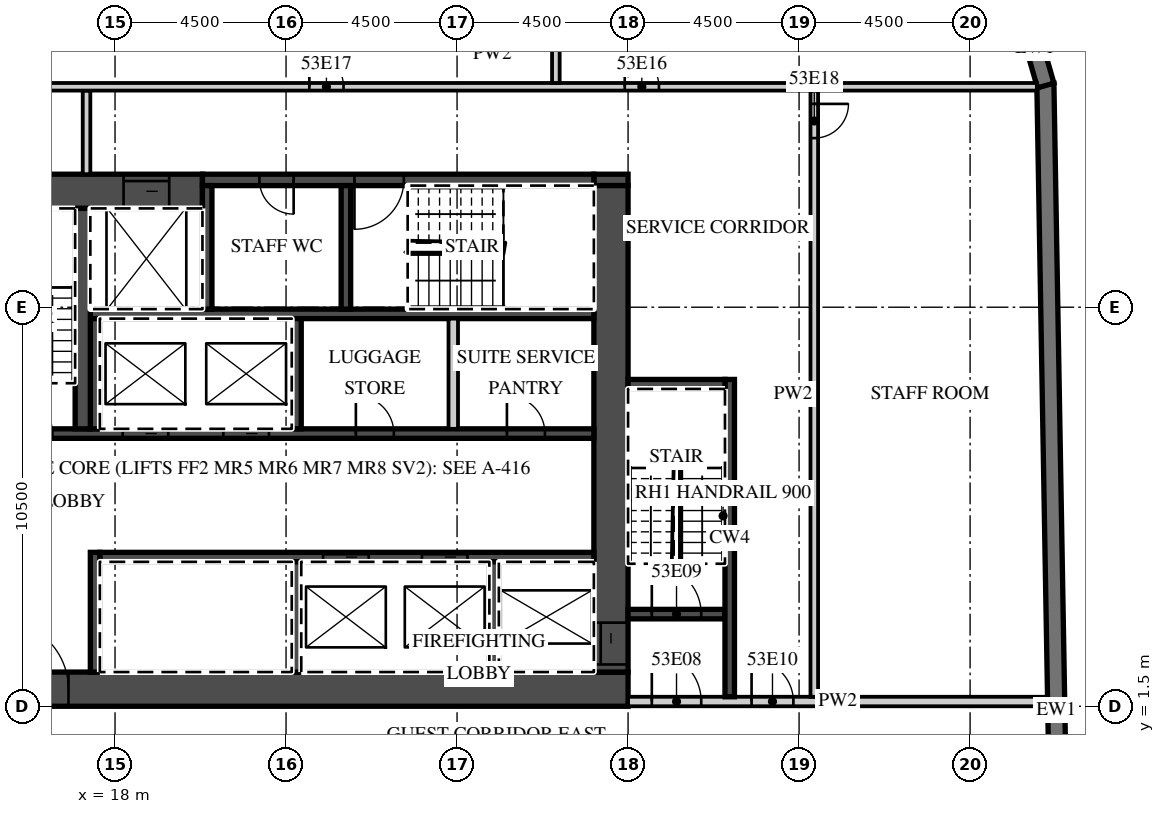
"""IFC4 building model, lengths in metres.
Left out: names, types, materials, properties, quantities, classifications, styles, units other than length and angle.
Written with IfcOpenShell. Run it as: python <this file> out.ifc"""

import sys

from ifc_helpers import new_model, si_unit, direction, frame, frame_2d, origin, place, context, subcontext, project, spatial, polyline, rectangle, outline, extrude, element, fill, save


model = new_model("IFC4")
c1 = context("Model", 3, precision=1e-05, world=origin(), true_north=direction((0.0, 1.0)))
c2 = subcontext(c1, "Body", "Model", "MODEL_VIEW")
j1 = project(units=[si_unit("LENGTHUNIT", "METRE"), si_unit("PLANEANGLEUNIT", "RADIAN")], contexts=[c1])
p1 = place(None, origin())
s1 = spatial("IfcSite", under=j1, at=p1, CompositionType="ELEMENT")
p2 = place(p1, origin())
s2 = spatial("IfcBuilding", under=s1, at=p2, CompositionType="ELEMENT")
p3 = place(p2, frame((0.0, 0.0, 221.0)))
s3 = spatial("IfcBuildingStorey", under=s2, at=p3, CompositionType="ELEMENT", Elevation=221.0)
p4 = place(p3, frame((43.057, -15.103, 0.0), z_axis=(0.0, 0.0, 1.0), x_axis=(-0.017452408953, 0.999847695112, 0.0)))
e1 = element("IfcWall", 1, at=p4, inside=s3, PredefinedType="SOLIDWALL", context=c2, shape_type="SweptSolid", body=[
    extrude(rectangle(XDim=33.0, YDim=0.45, at=frame_2d((16.5, 0.0))), origin(), (0.0, 0.0, 1.0), 3.02),
])
p5 = place(p3, frame((42.49, 17.833, 0.0), z_axis=(0.0, 0.0, 1.0), x_axis=(-0.275546368831, 0.961287781377, 0.0)))
e2 = element("IfcWall", 2, at=p5, inside=s3, PredefinedType="SOLIDWALL", context=c2, shape_type="SweptSolid", body=[
    extrude(outline(polyline([(0.0, -0.225), (2.071, -0.225), (1.95, 0.225), (0.121, 0.225), (0.0, -0.225)])), origin(), (0.0, 0.0, 1.0), 3.02),
])
p6 = place(p3, frame((13.5, 1.95, 0.0), z_axis=(0.0, 0.0, 1.0), x_axis=(1.0, 0.0, 0.0)))
e3 = element("IfcWall", 3, at=p6, inside=s3, PredefinedType="SHEAR", context=c2, shape_type="SweptSolid", body=[
    extrude(rectangle(XDim=18.0, YDim=0.9, at=frame_2d((9.0, 0.0))), origin(), (0.0, 0.0, 1.0), 3.02),
])
p7 = place(p6, frame((1.475, 0.0, 0.0)))
e4 = element("IfcOpeningElement", 4, at=p7, cuts=e3, PredefinedType="OPENING", context=c2, shape_type="SweptSolid", body=[
    extrude(rectangle(XDim=1.8, YDim=2.1, at=frame_2d((0.9, 1.05))), frame((0.0, 0.46, 0.0), z_axis=(0.0, -1.0, 0.0), x_axis=(1.0, 0.0, 0.0)), (0.0, 0.0, 1.0), 0.92),
])
p8 = place(p3, frame((13.5, 15.05, 0.0), z_axis=(0.0, 0.0, 1.0), x_axis=(1.0, 0.0, 0.0)))
e5 = element("IfcWall", 5, at=p8, inside=s3, PredefinedType="SHEAR", context=c2, shape_type="SweptSolid", body=[
    extrude(rectangle(XDim=6.8, YDim=0.9, at=frame_2d((3.4, 0.0))), origin(), (0.0, 0.0, 1.0), 3.02),
])
p9 = place(p8, frame((4.725, 0.0, 0.0)))
e6 = element("IfcOpeningElement", 6, at=p9, cuts=e5, PredefinedType="OPENING", context=c2, shape_type="SweptSolid", body=[
    extrude(rectangle(XDim=1.2, YDim=2.1, at=frame_2d((0.6, 1.05))), frame((0.0, 0.46, 0.0), z_axis=(0.0, -1.0, 0.0), x_axis=(1.0, 0.0, 0.0)), (0.0, 0.0, 1.0), 0.92),
])
p10 = place(p3, frame((30.6, 15.35, 0.0), z_axis=(0.0, 0.0, 1.0), x_axis=(1.0, 0.0, 0.0)))
e7 = element("IfcWall", 7, at=p10, inside=s3, PredefinedType="SHEAR", context=c2, shape_type="SweptSolid", body=[
    extrude(rectangle(XDim=0.9, YDim=0.3, at=frame_2d((0.45, 0.0))), origin(), (0.0, 0.0, 1.0), 3.02),
])
p11 = place(p3, frame((20.3, 15.35, 0.0), z_axis=(0.0, 0.0, 1.0), x_axis=(1.0, 0.0, 0.0)))
e8 = element("IfcWall", 8, at=p11, inside=s3, PredefinedType="SHEAR", context=c2, shape_type="SweptSolid", body=[
    extrude(rectangle(XDim=10.3, YDim=0.3, at=frame_2d((5.15, 0.0))), origin(), (0.0, 0.0, 1.0), 3.02),
])
p12 = place(p11, frame((4.0, 0.0, 0.0)))
e9 = element("IfcOpeningElement", 9, at=p12, cuts=e8, PredefinedType="OPENING", context=c2, shape_type="SweptSolid", body=[
    extrude(rectangle(XDim=1.3, YDim=2.1, at=frame_2d((0.65, 1.05))), frame((0.0, 0.16, 0.0), z_axis=(0.0, -1.0, 0.0), x_axis=(1.0, 0.0, 0.0)), (0.0, 0.0, 1.0), 0.32),
])
p13 = place(p11, frame((1.5, 0.0, 0.0)))
e10 = element("IfcOpeningElement", 10, at=p13, cuts=e8, PredefinedType="OPENING", context=c2, shape_type="SweptSolid", body=[
    extrude(rectangle(XDim=0.9, YDim=2.1, at=frame_2d((0.45, 1.05))), frame((0.0, 0.16, 0.0), z_axis=(0.0, -1.0, 0.0), x_axis=(1.0, 0.0, 0.0)), (0.0, 0.0, 1.0), 0.32),
])
p14 = place(p3, frame((31.05, 2.4, 0.0), z_axis=(0.0, 0.0, 1.0), x_axis=(0.0, 1.0, 0.0)))
e11 = element("IfcWall", 11, at=p14, inside=s3, PredefinedType="SHEAR", context=c2, shape_type="SweptSolid", body=[
    extrude(rectangle(XDim=12.8, YDim=0.9, at=frame_2d((6.4, 0.0))), origin(), (0.0, 0.0, 1.0), 3.02),
])
p15 = place(p14, frame((0.2, 0.0, 0.0)))
e12 = element("IfcOpeningElement", 12, at=p15, cuts=e11, PredefinedType="OPENING", context=c2, shape_type="SweptSolid", body=[
    extrude(rectangle(XDim=1.1, YDim=2.1, at=frame_2d((0.55, 1.05))), frame((0.0, 0.46, 0.0), z_axis=(0.0, -1.0, 0.0), x_axis=(1.0, 0.0, 0.0)), (0.0, 0.0, 1.0), 0.92),
])
p16 = place(p3, frame((17.6, 5.425, 0.0), z_axis=(0.0, 0.0, 1.0), x_axis=(1.0, 0.0, 0.0)))
e13 = element("IfcWall", 13, at=p16, inside=s3, PredefinedType="SHEAR", context=c2, shape_type="SweptSolid", body=[
    extrude(rectangle(XDim=13.0, YDim=0.25, at=frame_2d((6.5, 0.0))), origin(), (0.0, 0.0, 1.0), 3.02),
])
p17 = place(p16, frame((8.475, 0.0, 0.0)))
e14 = element("IfcOpeningElement", 14, at=p17, cuts=e13, PredefinedType="OPENING", context=c2, shape_type="SweptSolid", body=[
    extrude(rectangle(XDim=1.2, YDim=2.1, at=frame_2d((0.6, 1.05))), frame((0.0, 0.135, 0.0), z_axis=(0.0, -1.0, 0.0), x_axis=(1.0, 0.0, 0.0)), (0.0, 0.0, 1.0), 0.27),
])
p18 = place(p16, frame((5.875, 0.0, 0.0)))
e15 = element("IfcOpeningElement", 15, at=p18, cuts=e13, PredefinedType="OPENING", context=c2, shape_type="SweptSolid", body=[
    extrude(rectangle(XDim=1.2, YDim=2.1, at=frame_2d((0.6, 1.05))), frame((0.0, 0.135, 0.0), z_axis=(0.0, -1.0, 0.0), x_axis=(1.0, 0.0, 0.0)), (0.0, 0.0, 1.0), 0.27),
])
p19 = place(p3, frame((17.475, 2.4, 0.0), z_axis=(0.0, 0.0, 1.0), x_axis=(0.0, 1.0, 0.0)))
e16 = element("IfcWall", 16, at=p19, inside=s3, PredefinedType="SHEAR", context=c2, shape_type="SweptSolid", body=[
    extrude(rectangle(XDim=3.15, YDim=0.25, at=frame_2d((1.575, 0.0))), origin(), (0.0, 0.0, 1.0), 3.02),
])
for number, where, z_axis, x_axis in (
    (17, (27.975, 2.4, 0.0), (0.0, 0.0, 1.0), (0.0, 1.0, 0.0)),
    (18, (22.775, 2.4, 0.0), (0.0, 0.0, 1.0), (0.0, 1.0, 0.0)),
):
    element("IfcWall", number, at=place(p3, frame(where, z_axis=z_axis, x_axis=x_axis)), inside=s3, PredefinedType="SHEAR", context=c2, shape_type="SweptSolid", body=[
        extrude(rectangle(XDim=2.9, YDim=0.25, at=frame_2d((1.45, 0.0))), origin(), (0.0, 0.0, 1.0), 3.02),
    ])
p20 = place(p3, frame((14.4, 8.675, 0.0), z_axis=(0.0, 0.0, 1.0), x_axis=(1.0, 0.0, 0.0)))
e19 = element("IfcWall", 19, at=p20, inside=s3, PredefinedType="SHEAR", context=c2, shape_type="SweptSolid", body=[
    extrude(rectangle(XDim=16.2, YDim=0.25, at=frame_2d((8.1, 0.0))), origin(), (0.0, 0.0, 1.0), 3.02),
])
p21 = place(p20, frame((6.45, 0.0, 0.0)))
e20 = element("IfcOpeningElement", 20, at=p21, cuts=e19, PredefinedType="OPENING", context=c2, shape_type="SweptSolid", body=[
    extrude(rectangle(XDim=1.2, YDim=2.1, at=frame_2d((0.6, 1.05))), frame((0.0, 0.135, 0.0), z_axis=(0.0, -1.0, 0.0), x_axis=(1.0, 0.0, 0.0)), (0.0, 0.0, 1.0), 0.27),
])
p22 = place(p20, frame((3.8, 0.0, 0.0)))
e21 = element("IfcOpeningElement", 21, at=p22, cuts=e19, PredefinedType="OPENING", context=c2, shape_type="SweptSolid", body=[
    extrude(rectangle(XDim=1.2, YDim=2.1, at=frame_2d((0.6, 1.05))), frame((0.0, 0.135, 0.0), z_axis=(0.0, -1.0, 0.0), x_axis=(1.0, 0.0, 0.0)), (0.0, 0.0, 1.0), 0.27),
])
p23 = place(p20, frame((0.65, 0.0, 0.0)))
e22 = element("IfcOpeningElement", 22, at=p23, cuts=e19, PredefinedType="OPENING", context=c2, shape_type="SweptSolid", body=[
    extrude(rectangle(XDim=1.3, YDim=2.1, at=frame_2d((0.65, 1.05))), frame((0.0, 0.135, 0.0), z_axis=(0.0, -1.0, 0.0), x_axis=(1.0, 0.0, 0.0)), (0.0, 0.0, 1.0), 0.27),
])
p24 = place(p20, frame((13.913, 0.0, 0.0)))
e23 = element("IfcOpeningElement", 23, at=p24, cuts=e19, PredefinedType="OPENING", context=c2, shape_type="SweptSolid", body=[
    extrude(rectangle(XDim=1.0, YDim=2.1, at=frame_2d((0.5, 1.05))), frame((0.0, 0.135, 0.0), z_axis=(0.0, -1.0, 0.0), x_axis=(1.0, 0.0, 0.0)), (0.0, 0.0, 1.0), 0.27),
])
p25 = place(p20, frame((9.938, 0.0, 0.0)))
e24 = element("IfcOpeningElement", 24, at=p25, cuts=e19, PredefinedType="OPENING", context=c2, shape_type="SweptSolid", body=[
    extrude(rectangle(XDim=1.0, YDim=2.1, at=frame_2d((0.5, 1.05))), frame((0.0, 0.135, 0.0), z_axis=(0.0, -1.0, 0.0), x_axis=(1.0, 0.0, 0.0)), (0.0, 0.0, 1.0), 0.27),
])
p26 = place(p3, frame((17.35, 11.825, 0.0), z_axis=(0.0, 0.0, 1.0), x_axis=(1.0, 0.0, 0.0)))
e25 = element("IfcWall", 25, at=p26, inside=s3, PredefinedType="SHEAR", context=c2, shape_type="SweptSolid", body=[
    extrude(rectangle(XDim=13.25, YDim=0.25, at=frame_2d((6.625, 0.0))), origin(), (0.0, 0.0, 1.0), 3.02),
])
for number, where, z_axis, x_axis in (
    (26, (17.475, 8.8, 0.0), (0.0, 0.0, 1.0), (0.0, 1.0, 0.0)),
    (27, (22.775, 8.8, 0.0), (0.0, 0.0, 1.0), (0.0, 1.0, 0.0)),
):
    element("IfcWall", number, at=place(p3, frame(where, z_axis=z_axis, x_axis=x_axis)), inside=s3, PredefinedType="SHEAR", context=c2, shape_type="SweptSolid", body=[
        extrude(rectangle(XDim=2.9, YDim=0.25, at=frame_2d((1.45, 0.0))), origin(), (0.0, 0.0, 1.0), 3.02),
    ])
p27 = place(p3, frame((26.9, 8.8, 0.0), z_axis=(0.0, 0.0, 1.0), x_axis=(0.0, 1.0, 0.0)))
e28 = element("IfcWall", 28, at=p27, inside=s3, PredefinedType="PARTITIONING", context=c2, shape_type="SweptSolid", body=[
    extrude(rectangle(XDim=2.9, YDim=0.25, at=frame_2d((1.45, 0.0))), origin(), (0.0, 0.0, 1.0), 3.02),
])
p28 = place(p3, frame((17.15, 8.8, 0.0), z_axis=(0.0, 0.0, 1.0), x_axis=(0.0, 1.0, 0.0)))
e29 = element("IfcWall", 29, at=p28, inside=s3, PredefinedType="SHEAR", context=c2, shape_type="SweptSolid", body=[
    extrude(rectangle(XDim=5.8, YDim=0.4, at=frame_2d((2.9, 0.0))), origin(), (0.0, 0.0, 1.0), 3.02),
])
for number, where, z_axis, x_axis in (
    (30, (20.425, 11.95, 0.0), (0.0, 0.0, 1.0), (0.0, 1.0, 0.0)),
    (31, (24.075, 11.95, 0.0), (0.0, 0.0, 1.0), (0.0, 1.0, 0.0)),
):
    element("IfcWall", number, at=place(p3, frame(where, z_axis=z_axis, x_axis=x_axis)), inside=s3, PredefinedType="SHEAR", context=c2, shape_type="SweptSolid", body=[
        extrude(rectangle(XDim=3.25, YDim=0.25, at=frame_2d((1.625, 0.0))), origin(), (0.0, 0.0, 1.0), 3.02),
    ])
p29 = place(p3, frame((31.5, 1.625, 0.0), z_axis=(0.0, 0.0, 1.0), x_axis=(1.0, 0.0, 0.0)))
e32 = element("IfcWall", 32, at=p29, inside=s3, PredefinedType="PARTITIONING", context=c2, shape_type="SweptSolid", body=[
    extrude(rectangle(XDim=11.04, YDim=0.25, at=frame_2d((5.52, 0.0))), origin(), (0.0, 0.0, 1.0), 3.02),
])
p30 = place(p29, frame((0.625, 0.0, 0.0)))
e33 = element("IfcOpeningElement", 33, at=p30, cuts=e32, PredefinedType="OPENING", context=c2, shape_type="SweptSolid", body=[
    extrude(rectangle(XDim=1.3, YDim=2.1, at=frame_2d((0.65, 1.05))), frame((0.0, 0.135, 0.0), z_axis=(0.0, -1.0, 0.0), x_axis=(1.0, 0.0, 0.0)), (0.0, 0.0, 1.0), 0.27),
])
p31 = place(p29, frame((3.25, 0.0, 0.0)))
e34 = element("IfcOpeningElement", 34, at=p31, cuts=e32, PredefinedType="OPENING", context=c2, shape_type="SweptSolid", body=[
    extrude(rectangle(XDim=1.1, YDim=2.1, at=frame_2d((0.55, 1.05))), frame((0.0, 0.135, 0.0), z_axis=(0.0, -1.0, 0.0), x_axis=(1.0, 0.0, 0.0)), (0.0, 0.0, 1.0), 0.27),
])
p32 = place(p3, frame((31.5, 3.925, 0.0), z_axis=(0.0, 0.0, 1.0), x_axis=(1.0, 0.0, 0.0)))
e35 = element("IfcWall", 35, at=p32, inside=s3, PredefinedType="SHEAR", context=c2, shape_type="SweptSolid", body=[
    extrude(rectangle(XDim=2.55, YDim=0.25, at=frame_2d((1.275, 0.0))), origin(), (0.0, 0.0, 1.0), 3.02),
])
p33 = place(p32, frame((0.625, 0.0, 0.0)))
e36 = element("IfcOpeningElement", 36, at=p33, cuts=e35, PredefinedType="OPENING", context=c2, shape_type="SweptSolid", body=[
    extrude(rectangle(XDim=1.3, YDim=2.1, at=frame_2d((0.65, 1.05))), frame((0.0, 0.135, 0.0), z_axis=(0.0, -1.0, 0.0), x_axis=(1.0, 0.0, 0.0)), (0.0, 0.0, 1.0), 0.27),
])
p34 = place(p3, frame((34.175, 1.75, 0.0), z_axis=(0.0, 0.0, 1.0), x_axis=(0.0, 1.0, 0.0)))
e37 = element("IfcWall", 37, at=p34, inside=s3, PredefinedType="SHEAR", context=c2, shape_type="SweptSolid", body=[
    extrude(rectangle(XDim=8.35, YDim=0.25, at=frame_2d((4.175, 0.0))), origin(), (0.0, 0.0, 1.0), 3.02),
])
p35 = place(p3, frame((31.5, 9.975, 0.0), z_axis=(0.0, 0.0, 1.0), x_axis=(1.0, 0.0, 0.0)))
e38 = element("IfcWall", 38, at=p35, inside=s3, PredefinedType="SHEAR", context=c2, shape_type="SweptSolid", body=[
    extrude(rectangle(XDim=2.55, YDim=0.25, at=frame_2d((1.275, 0.0))), origin(), (0.0, 0.0, 1.0), 3.02),
])
p36 = place(p3, frame((17.25, 15.5, 0.0), z_axis=(0.0, 0.0, 1.0), x_axis=(0.0, 1.0, 0.0)))
e39 = element("IfcWall", 39, at=p36, inside=s3, PredefinedType="PARTITIONING", context=c2, shape_type="SweptSolid", body=[
    extrude(rectangle(XDim=2.2, YDim=0.2, at=frame_2d((1.1, 0.0))), origin(), (0.0, 0.0, 1.0), 3.02),
])
p37 = place(p3, frame((36.4, 1.75, 0.0), z_axis=(0.0, 0.0, 1.0), x_axis=(0.0, 1.0, 0.0)))
e40 = element("IfcWall", 40, at=p37, inside=s3, PredefinedType="PARTITIONING", context=c2, shape_type="SweptSolid", body=[
    extrude(rectangle(XDim=15.95, YDim=0.2, at=frame_2d((7.975, 0.0))), origin(), (0.0, 0.0, 1.0), 3.02),
])
p38 = place(p37, frame((14.7, 0.0, 0.0)))
e41 = element("IfcOpeningElement", 41, at=p38, cuts=e40, PredefinedType="OPENING", context=c2, shape_type="SweptSolid", body=[
    extrude(rectangle(XDim=0.9, YDim=2.1, at=frame_2d((0.45, 1.05))), frame((0.0, 0.11, 0.0), z_axis=(0.0, -1.0, 0.0), x_axis=(1.0, 0.0, 0.0)), (0.0, 0.0, 1.0), 0.22),
])
p39 = place(p3, frame((13.6, 17.8, 0.0), z_axis=(0.0, 0.0, 1.0), x_axis=(1.0, 0.0, 0.0)))
e42 = element("IfcWall", 42, at=p39, inside=s3, PredefinedType="PARTITIONING", context=c2, shape_type="SweptSolid", body=[
    extrude(rectangle(XDim=28.657, YDim=0.2, at=frame_2d((14.329, 0.0))), origin(), (0.0, 0.0, 1.0), 3.02),
])
p40 = place(p39, frame((17.812, 0.0, 0.0)))
e43 = element("IfcOpeningElement", 43, at=p40, cuts=e42, PredefinedType="OPENING", context=c2, shape_type="SweptSolid", body=[
    extrude(rectangle(XDim=0.9, YDim=2.1, at=frame_2d((0.45, 1.05))), frame((0.0, 0.11, 0.0), z_axis=(0.0, -1.0, 0.0), x_axis=(1.0, 0.0, 0.0)), (0.0, 0.0, 1.0), 0.22),
])
p41 = place(p39, frame((9.512, 0.0, 0.0)))
e44 = element("IfcOpeningElement", 44, at=p41, cuts=e42, PredefinedType="OPENING", context=c2, shape_type="SweptSolid", body=[
    extrude(rectangle(XDim=0.9, YDim=2.1, at=frame_2d((0.45, 1.05))), frame((0.0, 0.11, 0.0), z_axis=(0.0, -1.0, 0.0), x_axis=(1.0, 0.0, 0.0)), (0.0, 0.0, 1.0), 0.22),
])
p42 = place(p3, frame((29.6, 17.9, 0.0), z_axis=(0.0, 0.0, 1.0), x_axis=(0.0, 1.0, 0.0)))
e45 = element("IfcWall", 45, at=p42, inside=s3, PredefinedType="PARTITIONING", context=c2, shape_type="SweptSolid", body=[
    extrude(rectangle(XDim=3.318, YDim=0.2, at=frame_2d((1.659, 0.0))), origin(), (0.0, 0.0, 1.0), 3.02),
])
p43 = place(p21, origin())
e46 = element("IfcDoor", 46, at=p43, inside=s3, OperationType="SLIDING_TO_LEFT", PredefinedType="DOOR", context=c2, shape_type="SweptSolid", body=[
    extrude(rectangle(XDim=1.2, YDim=2.1, at=frame_2d((0.6, 1.05))), frame((0.0, 0.025, 0.0), z_axis=(0.0, -1.0, 0.0), x_axis=(1.0, 0.0, 0.0)), (0.0, 0.0, 1.0), 0.05),
])
fill(e20, e46)
p44 = place(p22, origin())
e47 = element("IfcDoor", 47, at=p44, inside=s3, OperationType="SLIDING_TO_RIGHT", PredefinedType="DOOR", context=c2, shape_type="SweptSolid", body=[
    extrude(rectangle(XDim=1.2, YDim=2.1, at=frame_2d((0.6, 1.05))), frame((0.0, 0.025, 0.0), z_axis=(0.0, -1.0, 0.0), x_axis=(1.0, 0.0, 0.0)), (0.0, 0.0, 1.0), 0.05),
])
fill(e21, e47)
p45 = place(p17, origin())
e48 = element("IfcDoor", 48, at=p45, inside=s3, OperationType="SLIDING_TO_LEFT", PredefinedType="DOOR", context=c2, shape_type="SweptSolid", body=[
    extrude(rectangle(XDim=1.2, YDim=2.1, at=frame_2d((0.6, 1.05))), frame((0.0, 0.025, 0.0), z_axis=(0.0, -1.0, 0.0), x_axis=(1.0, 0.0, 0.0)), (0.0, 0.0, 1.0), 0.05),
])
fill(e14, e48)
p46 = place(p18, origin())
e49 = element("IfcDoor", 49, at=p46, inside=s3, OperationType="SLIDING_TO_RIGHT", PredefinedType="DOOR", context=c2, shape_type="SweptSolid", body=[
    extrude(rectangle(XDim=1.2, YDim=2.1, at=frame_2d((0.6, 1.05))), frame((0.0, 0.025, 0.0), z_axis=(0.0, -1.0, 0.0), x_axis=(1.0, 0.0, 0.0)), (0.0, 0.0, 1.0), 0.05),
])
fill(e15, e49)
p47 = place(p9, origin())
e50 = element("IfcDoor", 50, at=p47, inside=s3, OperationType="SLIDING_TO_LEFT", PredefinedType="DOOR", context=c2, shape_type="SweptSolid", body=[
    extrude(rectangle(XDim=1.2, YDim=2.1, at=frame_2d((0.6, 1.05))), frame((0.0, 0.025, 0.0), z_axis=(0.0, -1.0, 0.0), x_axis=(1.0, 0.0, 0.0)), (0.0, 0.0, 1.0), 0.05),
])
fill(e6, e50)
p48 = place(p15, origin())
e51 = element("IfcDoor", 51, at=p48, inside=s3, OperationType="SLIDING_TO_LEFT", PredefinedType="DOOR", context=c2, shape_type="SweptSolid", body=[
    extrude(rectangle(XDim=1.1, YDim=2.1, at=frame_2d((0.55, 1.05))), frame((0.0, 0.025, 0.0), z_axis=(0.0, -1.0, 0.0), x_axis=(1.0, 0.0, 0.0)), (0.0, 0.0, 1.0), 0.05),
])
fill(e12, e51)
p49 = place(p7, origin())
e52 = element("IfcDoor", 52, at=p49, inside=s3, OperationType="DOUBLE_DOOR_DOUBLE_SWING", PredefinedType="DOOR", context=c2, shape_type="SweptSolid", body=[
    extrude(rectangle(XDim=1.8, YDim=2.1, at=frame_2d((0.9, 1.05))), frame((0.0, 0.025, 0.0), z_axis=(0.0, -1.0, 0.0), x_axis=(1.0, 0.0, 0.0)), (0.0, 0.0, 1.0), 0.05),
])
fill(e4, e52)
p50 = place(p30, origin())
e53 = element("IfcDoor", 53, at=p50, inside=s3, OperationType="SINGLE_SWING_LEFT", PredefinedType="DOOR", context=c2, shape_type="SweptSolid", body=[
    extrude(rectangle(XDim=1.3, YDim=2.1, at=frame_2d((0.65, 1.05))), frame((0.0, 0.025, 0.0), z_axis=(0.0, -1.0, 0.0), x_axis=(1.0, 0.0, 0.0)), (0.0, 0.0, 1.0), 0.05),
])
fill(e33, e53)
p51 = place(p33, origin())
e54 = element("IfcDoor", 54, at=p51, inside=s3, OperationType="SINGLE_SWING_LEFT", PredefinedType="DOOR", context=c2, shape_type="SweptSolid", body=[
    extrude(rectangle(XDim=1.3, YDim=2.1, at=frame_2d((0.65, 1.05))), frame((0.0, 0.025, 0.0), z_axis=(0.0, -1.0, 0.0), x_axis=(1.0, 0.0, 0.0)), (0.0, 0.0, 1.0), 0.05),
])
fill(e36, e54)
p52 = place(p31, origin())
e55 = element("IfcDoor", 55, at=p52, inside=s3, OperationType="SINGLE_SWING_LEFT", PredefinedType="DOOR", context=c2, shape_type="SweptSolid", body=[
    extrude(rectangle(XDim=1.1, YDim=2.1, at=frame_2d((0.55, 1.05))), frame((0.0, 0.025, 0.0), z_axis=(0.0, -1.0, 0.0), x_axis=(1.0, 0.0, 0.0)), (0.0, 0.0, 1.0), 0.05),
])
fill(e34, e55)
p53 = place(p12, origin())
e56 = element("IfcDoor", 56, at=p53, inside=s3, OperationType="SINGLE_SWING_LEFT", PredefinedType="DOOR", context=c2, shape_type="SweptSolid", body=[
    extrude(rectangle(XDim=1.3, YDim=2.1, at=frame_2d((0.65, 1.05))), frame((0.0, 0.025, 0.0), z_axis=(0.0, -1.0, 0.0), x_axis=(1.0, 0.0, 0.0)), (0.0, 0.0, 1.0), 0.05),
])
fill(e9, e56)
p54 = place(p13, origin())
e57 = element("IfcDoor", 57, at=p54, inside=s3, OperationType="SINGLE_SWING_RIGHT", PredefinedType="DOOR", context=c2, shape_type="SweptSolid", body=[
    extrude(rectangle(XDim=0.9, YDim=2.1, at=frame_2d((0.45, 1.05))), frame((0.0, 0.025, 0.0), z_axis=(0.0, -1.0, 0.0), x_axis=(1.0, 0.0, 0.0)), (0.0, 0.0, 1.0), 0.05),
])
fill(e10, e57)
p55 = place(p24, origin())
e58 = element("IfcDoor", 58, at=p55, inside=s3, OperationType="SINGLE_SWING_LEFT", PredefinedType="DOOR", context=c2, shape_type="SweptSolid", body=[
    extrude(rectangle(XDim=1.0, YDim=2.1, at=frame_2d((0.5, 1.05))), frame((0.0, 0.025, 0.0), z_axis=(0.0, -1.0, 0.0), x_axis=(1.0, 0.0, 0.0)), (0.0, 0.0, 1.0), 0.05),
])
fill(e23, e58)
p56 = place(p25, origin())
e59 = element("IfcDoor", 59, at=p56, inside=s3, OperationType="SINGLE_SWING_LEFT", PredefinedType="DOOR", context=c2, shape_type="SweptSolid", body=[
    extrude(rectangle(XDim=1.0, YDim=2.1, at=frame_2d((0.5, 1.05))), frame((0.0, 0.025, 0.0), z_axis=(0.0, -1.0, 0.0), x_axis=(1.0, 0.0, 0.0)), (0.0, 0.0, 1.0), 0.05),
])
fill(e24, e59)
p57 = place(p40, origin())
e60 = element("IfcDoor", 60, at=p57, inside=s3, OperationType="SINGLE_SWING_LEFT", PredefinedType="DOOR", context=c2, shape_type="SweptSolid", body=[
    extrude(rectangle(XDim=0.9, YDim=2.1, at=frame_2d((0.45, 1.05))), frame((0.0, 0.025, 0.0), z_axis=(0.0, -1.0, 0.0), x_axis=(1.0, 0.0, 0.0)), (0.0, 0.0, 1.0), 0.05),
])
fill(e43, e60)
p58 = place(p41, origin())
e61 = element("IfcDoor", 61, at=p58, inside=s3, OperationType="SINGLE_SWING_LEFT", PredefinedType="DOOR", context=c2, shape_type="SweptSolid", body=[
    extrude(rectangle(XDim=0.9, YDim=2.1, at=frame_2d((0.45, 1.05))), frame((0.0, 0.025, 0.0), z_axis=(0.0, -1.0, 0.0), x_axis=(1.0, 0.0, 0.0)), (0.0, 0.0, 1.0), 0.05),
])
fill(e44, e61)
p59 = place(p38, origin())
e62 = element("IfcDoor", 62, at=p59, inside=s3, OperationType="SINGLE_SWING_RIGHT", PredefinedType="DOOR", context=c2, shape_type="SweptSolid", body=[
    extrude(rectangle(XDim=0.9, YDim=2.1, at=frame_2d((0.45, 1.05))), frame((0.0, 0.025, 0.0), z_axis=(0.0, -1.0, 0.0), x_axis=(1.0, 0.0, 0.0)), (0.0, 0.0, 1.0), 0.05),
])
fill(e41, e62)
save(model, sys.argv[1])
